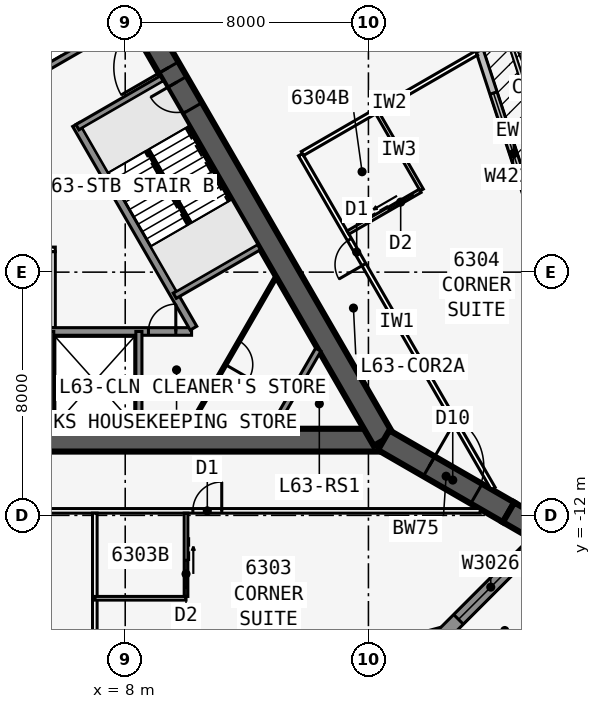
"""IFC4 building model, lengths in metres.
Left out: names, types, materials, properties, quantities, classifications, styles, units other than length and angle.
Written with IfcOpenShell. Run it as: python <this file> out.ifc"""

import sys

from ifc_helpers import new_model, si_unit, direction, frame, frame_2d, origin, place, context, subcontext, project, spatial, polyline, rectangle, outline, extrude, element, fill, save


model = new_model("IFC4")
c1 = context("Model", 3, precision=1e-05, world=origin(), true_north=direction((0.0, 1.0)))
c2 = subcontext(c1, "Body", "Model", "MODEL_VIEW")
j1 = project(units=[si_unit("LENGTHUNIT", "METRE"), si_unit("PLANEANGLEUNIT", "RADIAN")], contexts=[c1])
p1 = place(None, origin())
s1 = spatial("IfcSite", under=j1, at=p1, CompositionType="ELEMENT")
p2 = place(p1, origin())
s2 = spatial("IfcBuilding", under=s1, at=p2, CompositionType="ELEMENT")
p3 = place(p2, frame((0.0, 0.0, 239.3)))
s3 = spatial("IfcBuildingStorey", under=s2, at=p3, CompositionType="ELEMENT", Elevation=239.3)
p4 = place(p3, frame((-16.5, -9.526, 0.0), z_axis=(0.0, 0.0, 1.0), x_axis=(1.0, 0.0, 0.0)))
e1 = element("IfcWall", 1, at=p4, inside=s3, PredefinedType="SHEAR", context=c2, shape_type="SweptSolid", body=[
    extrude(rectangle(XDim=33.0, YDim=0.75, at=frame_2d((16.5, 0.0))), origin(), (0.0, 0.0, 1.0), 3.6),
])
p5 = place(p4, frame((14.05, 0.0, 0.0)))
e2 = element("IfcOpeningElement", 2, at=p5, cuts=e1, PredefinedType="OPENING", context=c2, shape_type="SweptSolid", body=[
    extrude(rectangle(XDim=1.8, YDim=2.13, at=frame_2d((0.9, 1.065))), frame((0.0, 0.385, 0.0), z_axis=(0.0, -1.0, 0.0), x_axis=(1.0, 0.0, 0.0)), (0.0, 0.0, 1.0), 0.77),
])
p6 = place(p3, frame((-0.55, -5.951, 0.0), z_axis=(0.0, 0.0, 1.0), x_axis=(1.0, 0.0, 0.0)))
e3 = element("IfcWall", 3, at=p6, inside=s3, PredefinedType="SOLIDWALL", context=c2, shape_type="SweptSolid", body=[
    extrude(rectangle(XDim=10.733, YDim=0.25, at=frame_2d((5.366, 0.0))), origin(), (0.0, 0.0, 1.0), 3.435),
])
p7 = place(p6, frame((9.314, 0.0, 0.0)))
e4 = element("IfcOpeningElement", 4, at=p7, cuts=e3, PredefinedType="OPENING", context=c2, shape_type="SweptSolid", body=[
    extrude(rectangle(XDim=0.9, YDim=2.13, at=frame_2d((0.45, 1.065))), frame((0.0, 0.135, 0.0), z_axis=(0.0, -1.0, 0.0), x_axis=(1.0, 0.0, 0.0)), (0.0, 0.0, 1.0), 0.27),
])
p8 = place(p6, frame((1.05, 0.0, 0.0)))
e5 = element("IfcOpeningElement", 5, at=p8, cuts=e3, PredefinedType="OPENING", context=c2, shape_type="SweptSolid", body=[
    extrude(rectangle(XDim=1.1, YDim=2.13, at=frame_2d((0.55, 1.065))), frame((0.0, 0.135, 0.0), z_axis=(0.0, -1.0, 0.0), x_axis=(1.0, 0.0, 0.0)), (0.0, 0.0, 1.0), 0.27),
])
p9 = place(p6, frame((4.05, 0.0, 0.0)))
e6 = element("IfcOpeningElement", 6, at=p9, cuts=e3, PredefinedType="OPENING", context=c2, shape_type="SweptSolid", body=[
    extrude(rectangle(XDim=1.1, YDim=2.13, at=frame_2d((0.55, 1.065))), frame((0.0, 0.135, 0.0), z_axis=(0.0, -1.0, 0.0), x_axis=(1.0, 0.0, 0.0)), (0.0, 0.0, 1.0), 0.27),
])
for number, where, z_axis, x_axis in (
    (7, (5.55, -5.951, 0.0), (0.0, 0.0, 1.0), (0.0, -1.0, 0.0)),
    (8, (8.45, -5.951, 0.0), (0.0, 0.0, 1.0), (0.0, -1.0, 0.0)),
):
    element("IfcWall", number, at=place(p3, frame(where, z_axis=z_axis, x_axis=x_axis)), inside=s3, PredefinedType="SOLIDWALL", context=c2, shape_type="SweptSolid", body=[
        extrude(rectangle(XDim=3.2, YDim=0.2, at=frame_2d((1.6, 0.0))), origin(), (0.0, 0.0, 1.0), 3.435),
    ])
p10 = place(p3, frame((16.5, -9.526, 0.0), z_axis=(0.0, 0.0, 1.0), x_axis=(-0.499999749417, 0.866025548458, 0.0)))
e9 = element("IfcWall", 9, at=p10, inside=s3, PredefinedType="SHEAR", context=c2, shape_type="SweptSolid", body=[
    extrude(rectangle(XDim=33.0, YDim=0.75, at=frame_2d((16.5, 0.0))), origin(), (0.0, 0.0, 1.0), 3.6),
])
p11 = place(p10, frame((14.15, 0.0, 0.0)))
e10 = element("IfcOpeningElement", 10, at=p11, cuts=e9, PredefinedType="OPENING", context=c2, shape_type="SweptSolid", body=[
    extrude(rectangle(XDim=1.8, YDim=2.13, at=frame_2d((0.9, 1.065))), frame((0.0, 0.385, 0.0), z_axis=(0.0, -1.0, 0.0), x_axis=(1.0, 0.0, 0.0)), (0.0, 0.0, 1.0), 0.77),
])
p12 = place(p10, frame((12.6, 0.0, 0.0)))
e11 = element("IfcOpeningElement", 11, at=p12, cuts=e9, PredefinedType="OPENING", context=c2, shape_type="SweptSolid", body=[
    extrude(rectangle(XDim=1.0, YDim=2.13, at=frame_2d((0.5, 1.065))), frame((0.0, 0.385, 0.0), z_axis=(0.0, -1.0, 0.0), x_axis=(1.0, 0.0, 0.0)), (0.0, 0.0, 1.0), 0.77),
])
p13 = place(p3, frame((10.245, -5.843, 0.0), z_axis=(0.0, 0.0, 1.0), x_axis=(-0.499993009313, 0.866029439822, 0.0)))
e12 = element("IfcWall", 12, at=p13, inside=s3, PredefinedType="SOLIDWALL", context=c2, shape_type="SweptSolid", body=[
    extrude(rectangle(XDim=7.733, YDim=0.25, at=frame_2d((3.866, 0.0))), origin(), (0.0, 0.0, 1.0), 3.435),
])
for number, where, z_axis, x_axis in (
    (13, (9.629, -4.775, 0.0), (0.0, 0.0, 1.0), (0.866, 0.5, 0.0)),
    (14, (6.429, 0.767, 0.0), (0.0, 0.0, 1.0), (0.866, 0.5, 0.0)),
):
    element("IfcWall", number, at=place(p3, frame(where, z_axis=z_axis, x_axis=x_axis)), inside=s3, PredefinedType="SOLIDWALL", context=c2, shape_type="SweptSolid", body=[
        extrude(rectangle(XDim=3.2, YDim=0.2, at=frame_2d((1.6, 0.0))), origin(), (0.0, 0.0, 1.0), 3.435),
    ])
p14 = place(p3, frame((5.329, 2.673, 0.0), z_axis=(0.0, 0.0, 1.0), x_axis=(0.866022944154, 0.50000426018, 0.0)))
e15 = element("IfcWall", 15, at=p14, inside=s3, PredefinedType="SOLIDWALL", context=c2, shape_type="SweptSolid", body=[
    extrude(rectangle(XDim=3.2, YDim=0.2, at=frame_2d((1.6, 0.0))), origin(), (0.0, 0.0, 1.0), 3.435),
])
p15 = place(p3, frame((16.5, -9.526, 0.0), z_axis=(0.0, 0.0, 1.0), x_axis=(0.866031398331, -0.499989616998, 0.0)))
e16 = element("IfcWall", 16, at=p15, inside=s3, PredefinedType="SHEAR", context=c2, shape_type="SweptSolid", body=[
    extrude(rectangle(XDim=4.746, YDim=0.75, at=frame_2d((2.373, 0.0))), origin(), (0.0, 0.0, 1.0), 3.6),
])
p16 = place(p15, frame((1.725, 0.0, 0.0)))
e17 = element("IfcOpeningElement", 17, at=p16, cuts=e16, PredefinedType="OPENING", context=c2, shape_type="SweptSolid", body=[
    extrude(rectangle(XDim=1.8, YDim=2.13, at=frame_2d((0.9, 1.065))), frame((0.0, 0.385, 0.0), z_axis=(0.0, -1.0, 0.0), x_axis=(1.0, 0.0, 0.0)), (0.0, 0.0, 1.0), 0.77),
])
p17 = place(p3, frame((20.61, -11.899, 0.0), z_axis=(0.0, 0.0, 1.0), x_axis=(0.866009537788, -0.500027479704, 0.0)))
e18 = element("IfcWall", 18, at=p17, inside=s3, PredefinedType="SHEAR", context=c2, shape_type="SweptSolid", body=[
    extrude(rectangle(XDim=1.155, YDim=0.75, at=frame_2d((0.577, 0.0))), origin(), (0.0, 0.0, 1.0), 3.6),
])
p18 = place(p3, frame((13.942, -17.103, 0.0), z_axis=(0.0, 0.0, 1.0), x_axis=(0.965913862671, 0.258863689806, 0.0)))
e19 = element("IfcWall", 19, at=p18, inside=s3, PredefinedType="SOLIDWALL", context=c2, shape_type="SweptSolid", body=[
    extrude(rectangle(XDim=4.782, YDim=0.45, at=frame_2d((2.391, 0.0))), origin(), (0.0, 0.0, 1.0), 3.435),
])
p19 = place(p18, frame((0.591, 0.0, 0.45)))
e20 = element("IfcOpeningElement", 20, at=p19, cuts=e19, PredefinedType="OPENING", context=c2, shape_type="SweptSolid", body=[
    extrude(rectangle(XDim=3.6, YDim=2.6, at=frame_2d((1.8, 1.3))), frame((0.0, 0.235, 0.0), z_axis=(0.0, -1.0, 0.0), x_axis=(1.0, 0.0, 0.0)), (0.0, 0.0, 1.0), 0.47),
])
p20 = place(p3, frame((18.46, -15.924, 0.0), z_axis=(0.0, 0.0, 1.0), x_axis=(0.707081252484, 0.707132308968, 0.0)))
e21 = element("IfcWall", 21, at=p20, inside=s3, PredefinedType="SOLIDWALL", context=c2, shape_type="SweptSolid", body=[
    extrude(outline(polyline([(4.782, 0.225), (4.723, 0.225), (4.303, 0.113), (4.273, 0.225), (0.0, 0.225), (0.0, -0.225), (4.782, -0.225), (4.782, 0.225)])), origin(), (0.0, 0.0, 1.0), 3.435),
])
p21 = place(p20, frame((0.711, 0.0, 0.45)))
e22 = element("IfcOpeningElement", 22, at=p21, cuts=e21, PredefinedType="OPENING", context=c2, shape_type="SweptSolid", body=[
    extrude(rectangle(XDim=3.0, YDim=2.6, at=frame_2d((1.5, 1.3))), frame((0.0, 0.235, 0.0), z_axis=(0.0, -1.0, 0.0), x_axis=(1.0, 0.0, 0.0)), (0.0, 0.0, 1.0), 0.47),
])
p22 = place(p3, frame((21.881, -3.503, 0.0), z_axis=(0.0, 0.0, 1.0), x_axis=(-0.311328857048, 0.95030223759, 0.0)))
e23 = element("IfcWall", 23, at=p22, inside=s3, PredefinedType="STANDARD", context=c2, shape_type="SweptSolid", body=[
    extrude(rectangle(XDim=7.153, YDim=0.25, at=frame_2d((3.576, 0.0))), origin(), (0.0, 0.0, 1.0), 3.435),
])
p23 = place(p22, frame((1.476, 0.0, 0.45)))
e24 = element("IfcOpeningElement", 24, at=p23, cuts=e23, PredefinedType="OPENING", context=c2, shape_type="SweptSolid", body=[
    extrude(rectangle(XDim=4.2, YDim=2.6, at=frame_2d((2.1, 1.3))), frame((0.0, 0.135, 0.0), z_axis=(0.0, -1.0, 0.0), x_axis=(1.0, 0.0, 0.0)), (0.0, 0.0, 1.0), 0.27),
])
p24 = place(p3, frame((19.658, 3.284, 0.0), z_axis=(0.0, 0.0, 1.0), x_axis=(-0.393290226175, 0.91941437774, 0.0)))
e25 = element("IfcWall", 25, at=p24, inside=s3, PredefinedType="STANDARD", context=c2, shape_type="SweptSolid", body=[
    extrude(rectangle(XDim=2.014, YDim=0.25, at=frame_2d((1.007, 0.0))), origin(), (0.0, 0.0, 1.0), 3.435),
])
p25 = place(p3, frame((23.865, -13.779, 0.0), z_axis=(0.0, 0.0, 1.0), x_axis=(-0.707106781187, -0.707106781187, 0.0)))
e26 = element("IfcWall", 26, at=p25, inside=s3, PredefinedType="PARAPET", context=c2, shape_type="SweptSolid", body=[
    extrude(rectangle(XDim=4.104, YDim=0.3, at=frame_2d((2.052, 0.0))), origin(), (0.0, 0.0, 1.0), 1.1),
])
p26 = place(p3, frame((-19.677, -11.851, 0.0), z_axis=(0.0, 0.0, 1.0), x_axis=(1.0, 0.0, 0.0)))
e27 = element("IfcWall", 27, at=p26, inside=s3, PredefinedType="PARTITIONING", context=c2, shape_type="SweptSolid", body=[
    extrude(rectangle(XDim=39.354, YDim=0.15, at=frame_2d((19.677, 0.0))), origin(), (0.0, 0.0, 1.0), 3.435),
])
p27 = place(p26, frame((8.502, 0.0, 0.0)))
e28 = element("IfcOpeningElement", 28, at=p27, cuts=e27, PredefinedType="OPENING", context=c2, shape_type="SweptSolid", body=[
    extrude(rectangle(XDim=0.95, YDim=2.13, at=frame_2d((0.475, 1.065))), frame((0.0, 0.085, 0.0), z_axis=(0.0, -1.0, 0.0), x_axis=(1.0, 0.0, 0.0)), (0.0, 0.0, 1.0), 0.17),
])
p28 = place(p26, frame((15.677, 0.0, 0.0)))
e29 = element("IfcOpeningElement", 29, at=p28, cuts=e27, PredefinedType="OPENING", context=c2, shape_type="SweptSolid", body=[
    extrude(rectangle(XDim=1.0, YDim=2.13, at=frame_2d((0.5, 1.065))), frame((0.0, 0.085, 0.0), z_axis=(0.0, -1.0, 0.0), x_axis=(1.0, 0.0, 0.0)), (0.0, 0.0, 1.0), 0.17),
])
p29 = place(p26, frame((22.902, 0.0, 0.0)))
e30 = element("IfcOpeningElement", 30, at=p29, cuts=e27, PredefinedType="OPENING", context=c2, shape_type="SweptSolid", body=[
    extrude(rectangle(XDim=0.95, YDim=2.13, at=frame_2d((0.475, 1.065))), frame((0.0, 0.085, 0.0), z_axis=(0.0, -1.0, 0.0), x_axis=(1.0, 0.0, 0.0)), (0.0, 0.0, 1.0), 0.17),
])
p30 = place(p26, frame((29.902, 0.0, 0.0)))
e31 = element("IfcOpeningElement", 31, at=p30, cuts=e27, PredefinedType="OPENING", context=c2, shape_type="SweptSolid", body=[
    extrude(rectangle(XDim=0.95, YDim=2.13, at=frame_2d((0.475, 1.065))), frame((0.0, 0.085, 0.0), z_axis=(0.0, -1.0, 0.0), x_axis=(1.0, 0.0, 0.0)), (0.0, 0.0, 1.0), 0.17),
])
p31 = place(p3, frame((7.0, -11.926, 0.0), z_axis=(0.0, 0.0, 1.0), x_axis=(0.0, -1.0, 0.0)))
e32 = element("IfcWall", 32, at=p31, inside=s3, PredefinedType="PARTITIONING", context=c2, shape_type="SweptSolid", body=[
    extrude(rectangle(XDim=6.609, YDim=0.15, at=frame_2d((3.304, 0.0))), origin(), (0.0, 0.0, 1.0), 2.678),
])
p32 = place(p3, frame((7.0, -14.726, 0.0), z_axis=(0.0, 0.0, 1.0), x_axis=(1.0, 0.0, 0.0)))
e33 = element("IfcWall", 33, at=p32, inside=s3, PredefinedType="PLUMBINGWALL", context=c2, shape_type="SweptSolid", body=[
    extrude(rectangle(XDim=3.0, YDim=0.12, at=frame_2d((1.5, 0.0))), origin(), (0.0, 0.0, 1.0), 3.435),
])
p33 = place(p3, frame((10.0, -11.926, 0.0), z_axis=(0.0, 0.0, 1.0), x_axis=(0.0, -1.0, 0.0)))
e34 = element("IfcWall", 34, at=p33, inside=s3, PredefinedType="PLUMBINGWALL", context=c2, shape_type="SweptSolid", body=[
    extrude(rectangle(XDim=2.74, YDim=0.12, at=frame_2d((1.37, 0.0))), origin(), (0.0, 0.0, 1.0), 3.435),
])
p34 = place(p33, frame((1.55, 0.0, 0.0)))
e35 = element("IfcOpeningElement", 35, at=p34, cuts=e34, PredefinedType="OPENING", context=c2, shape_type="SweptSolid", body=[
    extrude(rectangle(XDim=0.9, YDim=2.13, at=frame_2d((0.45, 1.065))), frame((0.0, 0.07, 0.0), z_axis=(0.0, -1.0, 0.0), x_axis=(1.0, 0.0, 0.0)), (0.0, 0.0, 1.0), 0.14),
])
p35 = place(p3, frame((20.102, -11.115, 0.0), z_axis=(0.0, 0.0, 1.0), x_axis=(-0.500001960654, 0.866024271797, 0.0)))
e36 = element("IfcWall", 36, at=p35, inside=s3, PredefinedType="PARTITIONING", context=c2, shape_type="SweptSolid", body=[
    extrude(rectangle(XDim=12.677, YDim=0.15, at=frame_2d((6.339, 0.0))), origin(), (0.0, 0.0, 1.0), 3.435),
])
p36 = place(p35, frame((8.502, 0.0, 0.0)))
e37 = element("IfcOpeningElement", 37, at=p36, cuts=e36, PredefinedType="OPENING", context=c2, shape_type="SweptSolid", body=[
    extrude(rectangle(XDim=0.95, YDim=2.13, at=frame_2d((0.475, 1.065))), frame((0.0, 0.085, 0.0), z_axis=(0.0, -1.0, 0.0), x_axis=(1.0, 0.0, 0.0)), (0.0, 0.0, 1.0), 0.17),
])
p37 = place(p3, frame((13.829, -0.099, 0.0), z_axis=(0.0, 0.0, 1.0), x_axis=(0.866022562216, 0.500004921708, 0.0)))
e38 = element("IfcWall", 38, at=p37, inside=s3, PredefinedType="PARTITIONING", context=c2, shape_type="SweptSolid", body=[
    extrude(rectangle(XDim=6.609, YDim=0.15, at=frame_2d((3.304, 0.0))), origin(), (0.0, 0.0, 1.0), 2.678),
])
p38 = place(p3, frame((17.753, -1.297, 0.0), z_axis=(0.0, 0.0, 1.0), x_axis=(-0.499990139034, 0.866031096941, 0.0)))
e39 = element("IfcWall", 39, at=p38, inside=s3, PredefinedType="PLUMBINGWALL", context=c2, shape_type="SweptSolid", body=[
    extrude(rectangle(XDim=3.0, YDim=0.12, at=frame_2d((1.5, 0.0))), origin(), (0.0, 0.0, 1.0), 3.435),
])
p39 = place(p3, frame((15.329, -2.697, 0.0), z_axis=(0.0, 0.0, 1.0), x_axis=(0.866035715982, 0.499982138324, 0.0)))
e40 = element("IfcWall", 40, at=p39, inside=s3, PredefinedType="PLUMBINGWALL", context=c2, shape_type="SweptSolid", body=[
    extrude(rectangle(XDim=2.74, YDim=0.12, at=frame_2d((1.37, 0.0))), origin(), (0.0, 0.0, 1.0), 3.435),
])
p40 = place(p39, frame((1.55, 0.0, 0.0)))
e41 = element("IfcOpeningElement", 41, at=p40, cuts=e40, PredefinedType="OPENING", context=c2, shape_type="SweptSolid", body=[
    extrude(rectangle(XDim=0.9, YDim=2.13, at=frame_2d((0.45, 1.065))), frame((0.0, 0.07, 0.0), z_axis=(0.0, -1.0, 0.0), x_axis=(1.0, 0.0, 0.0)), (0.0, 0.0, 1.0), 0.14),
])
p41 = place(p3, frame((-2.65, -3.251, 0.0), z_axis=(0.0, 0.0, 1.0), x_axis=(1.0, 0.0, 0.0)))
e42 = element("IfcWall", 42, at=p41, inside=s3, PredefinedType="PARTITIONING", context=c2, shape_type="SweptSolid", body=[
    extrude(rectangle(XDim=8.35, YDim=0.15, at=frame_2d((4.175, 0.0))), origin(), (0.0, 0.0, 1.0), 3.435),
])
p42 = place(p3, frame((5.625, -5.826, 0.0), z_axis=(0.0, 0.0, 1.0), x_axis=(0.0, 1.0, 0.0)))
e43 = element("IfcWall", 43, at=p42, inside=s3, PredefinedType="PARTITIONING", context=c2, shape_type="SweptSolid", body=[
    extrude(rectangle(XDim=2.5, YDim=0.15, at=frame_2d((1.25, 0.0))), origin(), (0.0, 0.0, 1.0), 3.435),
])
p43 = place(p3, frame((14.349, -6.551, 0.0), z_axis=(0.0, 0.0, 1.0), x_axis=(-0.499952404951, -0.866052881055, 0.0)))
e44 = element("IfcWall", 44, at=p43, inside=s3, PredefinedType="SOLIDWALL", context=c2, shape_type="SweptSolid", body=[
    extrude(rectangle(XDim=3.002, YDim=0.2, at=frame_2d((1.501, 0.0))), origin(), (0.0, 0.0, 1.0), 3.435),
])
p44 = place(p3, frame((12.964, -4.151, 0.0), z_axis=(0.0, 0.0, 1.0), x_axis=(-0.500027479704, -0.866009537788, 0.0)))
e45 = element("IfcWall", 45, at=p44, inside=s3, PredefinedType="PARTITIONING", context=c2, shape_type="SweptSolid", body=[
    extrude(rectangle(XDim=5.774, YDim=0.1, at=frame_2d((2.887, 0.0))), origin(), (0.0, 0.0, 1.0), 3.435),
])
p45 = place(p44, frame((2.437, 0.0, 0.0)))
e46 = element("IfcOpeningElement", 46, at=p45, cuts=e45, PredefinedType="OPENING", context=c2, shape_type="SweptSolid", body=[
    extrude(rectangle(XDim=0.9, YDim=2.13, at=frame_2d((0.45, 1.065))), frame((0.0, 0.06, 0.0), z_axis=(0.0, -1.0, 0.0), x_axis=(1.0, 0.0, 0.0)), (0.0, 0.0, 1.0), 0.12),
])
p46 = place(p3, frame((10.135, -2.401, 0.0), z_axis=(0.0, 0.0, 1.0), x_axis=(-0.499992232847, 0.866029888106, 0.0)))
e47 = element("IfcWall", 47, at=p46, inside=s3, PredefinedType="SOLIDWALL", context=c2, shape_type="SweptSolid", body=[
    extrude(rectangle(XDim=2.794, YDim=0.1, at=frame_2d((1.397, 0.0))), origin(), (0.0, 0.0, 1.0), 3.6),
])
p47 = place(p21, origin())
e48 = element("IfcWindow", 48, at=p47, inside=s3, PartitioningType="SINGLE_PANEL", PredefinedType="WINDOW", context=c2, shape_type="SweptSolid", body=[
    extrude(rectangle(XDim=3.0, YDim=2.6, at=frame_2d((1.5, 1.3))), frame((0.0, 0.03, 0.0), z_axis=(0.0, -1.0, 0.0), x_axis=(1.0, 0.0, 0.0)), (0.0, 0.0, 1.0), 0.06),
])
fill(e22, e48)
p48 = place(p23, origin())
e49 = element("IfcWindow", 49, at=p48, inside=s3, PartitioningType="SINGLE_PANEL", PredefinedType="WINDOW", context=c2, shape_type="SweptSolid", body=[
    extrude(rectangle(XDim=4.2, YDim=2.6, at=frame_2d((2.1, 1.3))), frame((0.0, 0.03, 0.0), z_axis=(0.0, -1.0, 0.0), x_axis=(1.0, 0.0, 0.0)), (0.0, 0.0, 1.0), 0.06),
])
fill(e24, e49)
p49 = place(p34, origin())
e50 = element("IfcDoor", 50, at=p49, inside=s3, OperationType="SLIDING_TO_LEFT", PredefinedType="DOOR", context=c2, shape_type="SweptSolid", body=[
    extrude(rectangle(XDim=0.9, YDim=2.13, at=frame_2d((0.45, 1.065))), frame((0.0, 0.025, 0.0), z_axis=(0.0, -1.0, 0.0), x_axis=(1.0, 0.0, 0.0)), (0.0, 0.0, 1.0), 0.05),
])
fill(e35, e50)
p50 = place(p30, origin())
e51 = element("IfcDoor", 51, at=p50, inside=s3, OperationType="SINGLE_SWING_RIGHT", PredefinedType="DOOR", context=c2, shape_type="SweptSolid", body=[
    extrude(rectangle(XDim=0.95, YDim=2.13, at=frame_2d((0.475, 1.065))), frame((0.0, 0.025, 0.0), z_axis=(0.0, -1.0, 0.0), x_axis=(1.0, 0.0, 0.0)), (0.0, 0.0, 1.0), 0.05),
])
fill(e31, e51)
p51 = place(p40, origin())
e52 = element("IfcDoor", 52, at=p51, inside=s3, OperationType="SLIDING_TO_LEFT", PredefinedType="DOOR", context=c2, shape_type="SweptSolid", body=[
    extrude(rectangle(XDim=0.9, YDim=2.13, at=frame_2d((0.45, 1.065))), frame((0.0, 0.025, 0.0), z_axis=(0.0, -1.0, 0.0), x_axis=(1.0, 0.0, 0.0)), (0.0, 0.0, 1.0), 0.05),
])
fill(e41, e52)
p52 = place(p36, origin())
e53 = element("IfcDoor", 53, at=p52, inside=s3, OperationType="SINGLE_SWING_LEFT", PredefinedType="DOOR", context=c2, shape_type="SweptSolid", body=[
    extrude(rectangle(XDim=0.95, YDim=2.13, at=frame_2d((0.475, 1.065))), frame((0.0, 0.025, 0.0), z_axis=(0.0, -1.0, 0.0), x_axis=(1.0, 0.0, 0.0)), (0.0, 0.0, 1.0), 0.05),
])
fill(e37, e53)
p53 = place(p11, origin())
e54 = element("IfcDoor", 54, at=p53, inside=s3, OperationType="DOUBLE_DOOR_SINGLE_SWING", PredefinedType="DOOR", context=c2, shape_type="SweptSolid", body=[
    extrude(rectangle(XDim=1.8, YDim=2.13, at=frame_2d((0.9, 1.065))), frame((0.0, 0.025, 0.0), z_axis=(0.0, -1.0, 0.0), x_axis=(1.0, 0.0, 0.0)), (0.0, 0.0, 1.0), 0.05),
])
fill(e10, e54)
p54 = place(p12, origin())
e55 = element("IfcDoor", 55, at=p54, inside=s3, OperationType="SINGLE_SWING_RIGHT", PredefinedType="DOOR", context=c2, shape_type="SweptSolid", body=[
    extrude(rectangle(XDim=1.0, YDim=2.13, at=frame_2d((0.5, 1.065))), frame((0.0, 0.025, 0.0), z_axis=(0.0, -1.0, 0.0), x_axis=(1.0, 0.0, 0.0)), (0.0, 0.0, 1.0), 0.05),
])
fill(e11, e55)
p55 = place(p16, origin())
e56 = element("IfcDoor", 56, at=p55, inside=s3, OperationType="DOUBLE_DOOR_DOUBLE_SWING", PredefinedType="DOOR", context=c2, shape_type="SweptSolid", body=[
    extrude(rectangle(XDim=1.8, YDim=2.13, at=frame_2d((0.9, 1.065))), frame((0.0, 0.025, 0.0), z_axis=(0.0, -1.0, 0.0), x_axis=(1.0, 0.0, 0.0)), (0.0, 0.0, 1.0), 0.05),
])
fill(e17, e56)
p56 = place(p45, origin())
e57 = element("IfcDoor", 57, at=p56, inside=s3, OperationType="SINGLE_SWING_RIGHT", PredefinedType="DOOR", context=c2, shape_type="SweptSolid", body=[
    extrude(rectangle(XDim=0.9, YDim=2.13, at=frame_2d((0.45, 1.065))), frame((0.0, 0.025, 0.0), z_axis=(0.0, -1.0, 0.0), x_axis=(1.0, 0.0, 0.0)), (0.0, 0.0, 1.0), 0.05),
])
fill(e46, e57)
p57 = place(p7, origin())
e58 = element("IfcDoor", 58, at=p57, inside=s3, OperationType="SINGLE_SWING_RIGHT", PredefinedType="DOOR", context=c2, shape_type="SweptSolid", body=[
    extrude(rectangle(XDim=0.9, YDim=2.13, at=frame_2d((0.45, 1.065))), frame((0.0, 0.025, 0.0), z_axis=(0.0, -1.0, 0.0), x_axis=(1.0, 0.0, 0.0)), (0.0, 0.0, 1.0), 0.05),
])
fill(e4, e58)
save(model, sys.argv[1])
